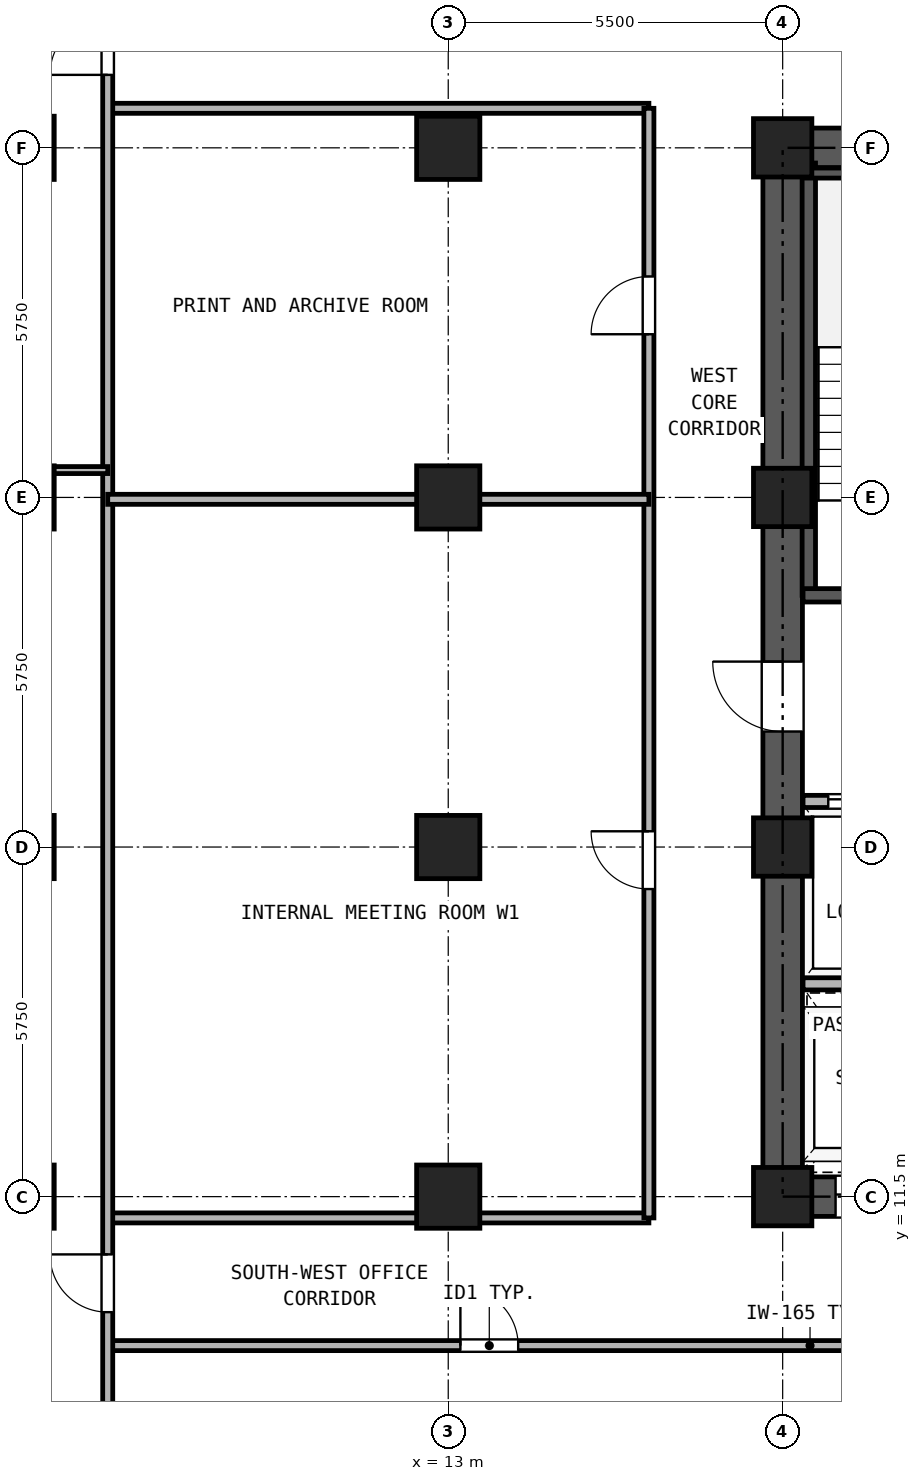
"""IFC4 building model, lengths in metres.
Left out: names, types, materials, properties, quantities, classifications, styles, units other than length and angle.
Written with IfcOpenShell. Run it as: python <this file> out.ifc"""

import sys

from ifc_helpers import new_model, si_unit, direction, frame, frame_2d, origin, origin_2d, place, context, subcontext, project, spatial, rectangle, hollow_rectangle, extrude, source, transform, mapped, element, fill, save


model = new_model("IFC4")
c1 = context("Model", 3, precision=1e-05, world=origin(), true_north=direction((0.0, 1.0)))
c2 = subcontext(c1, "Body", "Model", "MODEL_VIEW")
j1 = project(units=[si_unit("LENGTHUNIT", "METRE"), si_unit("PLANEANGLEUNIT", "RADIAN")], contexts=[c1])
p1 = place(None, origin())
s1 = spatial("IfcSite", under=j1, at=p1, CompositionType="ELEMENT")
p2 = place(p1, origin())
s2 = spatial("IfcBuilding", under=s1, at=p2, CompositionType="ELEMENT")
p3 = place(p2, frame((0.0, 0.0, 36.9)))
s3 = spatial("IfcBuildingStorey", under=s2, at=p3, CompositionType="ELEMENT", Elevation=36.9)
m1 = source(origin(), c2, "Body", "SweptSolid", [
    extrude(hollow_rectangle(XDim=1.04, YDim=1.04, WallThickness=0.065, at=origin_2d()), origin(), (0.0, 0.0, 1.0), 3.32),
])
for number, where, z_axis, x_axis in (
    (1, (6.0, 11.5, 0.0), (0.0, 0.0, 1.0), (1.0, 0.0, 0.0)),
    (2, (6.0, 17.25, 0.0), (0.0, 0.0, 1.0), (1.0, 0.0, 0.0)),
    (3, (6.0, 23.0, 0.0), (0.0, 0.0, 1.0), (1.0, 0.0, 0.0)),
    (4, (6.0, 28.75, 0.0), (0.0, 0.0, 1.0), (1.0, 0.0, 0.0)),
    (5, (13.0, 11.5, 0.0), (0.0, 0.0, 1.0), (1.0, 0.0, 0.0)),
    (6, (13.0, 17.25, 0.0), (0.0, 0.0, 1.0), (1.0, 0.0, 0.0)),
    (7, (13.0, 23.0, 0.0), (0.0, 0.0, 1.0), (1.0, 0.0, 0.0)),
    (8, (13.0, 28.75, 0.0), (0.0, 0.0, 1.0), (1.0, 0.0, 0.0)),
):
    element("IfcColumn", number, at=place(p3, frame(where, z_axis=z_axis, x_axis=x_axis)), inside=s3, PredefinedType="COLUMN", context=c2, shape_type="MappedRepresentation", body=[
        mapped(m1, transform((0.0, 0.0, 0.0), x_axis=(1.0, 0.0, 0.0), y_axis=(0.0, 1.0, 0.0), z_axis=(0.0, 0.0, 1.0), scale=1.0)),
    ])
m2 = source(origin(), c2, "Body", "SweptSolid", [
    extrude(hollow_rectangle(XDim=0.96, YDim=0.96, WallThickness=0.06, at=origin_2d()), origin(), (0.0, 0.0, 1.0), 3.32),
])
for number, where, z_axis, x_axis in (
    (9, (18.5, 11.5, 0.0), (0.0, 0.0, 1.0), (1.0, 0.0, 0.0)),
    (10, (18.5, 17.25, 0.0), (0.0, 0.0, 1.0), (1.0, 0.0, 0.0)),
    (11, (18.5, 23.0, 0.0), (0.0, 0.0, 1.0), (1.0, 0.0, 0.0)),
    (12, (18.5, 28.75, 0.0), (0.0, 0.0, 1.0), (1.0, 0.0, 0.0)),
):
    element("IfcColumn", number, at=place(p3, frame(where, z_axis=z_axis, x_axis=x_axis)), inside=s3, PredefinedType="COLUMN", context=c2, shape_type="MappedRepresentation", body=[
        mapped(m2, transform((0.0, 0.0, 0.0), x_axis=(1.0, 0.0, 0.0), y_axis=(0.0, 1.0, 0.0), z_axis=(0.0, 0.0, 1.0), scale=1.0)),
    ])
p4 = place(p3, frame((18.175, 11.5, 0.0), z_axis=(0.0, 0.0, 1.0), x_axis=(1.0, 0.0, 0.0)))
e13 = element("IfcWall", 13, at=p4, inside=s3, PredefinedType="SHEAR", context=c2, shape_type="SweptSolid", body=[
    extrude(rectangle(XDim=10.65, YDim=0.65, at=frame_2d((5.325, 0.0))), origin(), (0.0, 0.0, 1.0), 3.32),
])
p5 = place(p4, frame((1.195, 0.0, 0.0)))
e14 = element("IfcOpeningElement", 14, at=p5, cuts=e13, PredefinedType="OPENING", context=c2, shape_type="SweptSolid", body=[
    extrude(rectangle(XDim=1.1, YDim=2.25, at=frame_2d((0.55, 1.125))), frame((0.0, 0.335, 0.0), z_axis=(0.0, -1.0, 0.0), x_axis=(1.0, 0.0, 0.0)), (0.0, 0.0, 1.0), 0.67),
])
p6 = place(p4, frame((3.495, 0.0, 0.0)))
e15 = element("IfcOpeningElement", 15, at=p6, cuts=e13, PredefinedType="OPENING", context=c2, shape_type="SweptSolid", body=[
    extrude(rectangle(XDim=1.1, YDim=2.25, at=frame_2d((0.55, 1.125))), frame((0.0, 0.335, 0.0), z_axis=(0.0, -1.0, 0.0), x_axis=(1.0, 0.0, 0.0)), (0.0, 0.0, 1.0), 0.67),
])
p7 = place(p4, frame((5.925, 0.0, 0.0)))
e16 = element("IfcOpeningElement", 16, at=p7, cuts=e13, PredefinedType="OPENING", context=c2, shape_type="SweptSolid", body=[
    extrude(rectangle(XDim=1.1, YDim=2.25, at=frame_2d((0.55, 1.125))), frame((0.0, 0.335, 0.0), z_axis=(0.0, -1.0, 0.0), x_axis=(1.0, 0.0, 0.0)), (0.0, 0.0, 1.0), 0.67),
])
p8 = place(p4, frame((8.325, 0.0, 0.0)))
e17 = element("IfcOpeningElement", 17, at=p8, cuts=e13, PredefinedType="OPENING", context=c2, shape_type="SweptSolid", body=[
    extrude(rectangle(XDim=1.1, YDim=2.25, at=frame_2d((0.55, 1.125))), frame((0.0, 0.335, 0.0), z_axis=(0.0, -1.0, 0.0), x_axis=(1.0, 0.0, 0.0)), (0.0, 0.0, 1.0), 0.67),
])
p9 = place(p3, frame((18.175, 28.75, 0.0), z_axis=(0.0, 0.0, 1.0), x_axis=(1.0, 0.0, 0.0)))
e18 = element("IfcWall", 18, at=p9, inside=s3, PredefinedType="SHEAR", context=c2, shape_type="SweptSolid", body=[
    extrude(rectangle(XDim=10.65, YDim=0.65, at=frame_2d((5.325, 0.0))), origin(), (0.0, 0.0, 1.0), 3.32),
])
p10 = place(p9, frame((4.205, 0.0, 0.0)))
e19 = element("IfcOpeningElement", 19, at=p10, cuts=e18, PredefinedType="OPENING", context=c2, shape_type="SweptSolid", body=[
    extrude(rectangle(XDim=0.9, YDim=2.05, at=frame_2d((0.45, 1.025))), frame((0.0, 0.335, 0.0), z_axis=(0.0, -1.0, 0.0), x_axis=(1.0, 0.0, 0.0)), (0.0, 0.0, 1.0), 0.67),
])
p11 = place(p9, frame((5.745, 0.0, 0.0)))
e20 = element("IfcOpeningElement", 20, at=p11, cuts=e18, PredefinedType="OPENING", context=c2, shape_type="SweptSolid", body=[
    extrude(rectangle(XDim=0.9, YDim=2.05, at=frame_2d((0.45, 1.025))), frame((0.0, 0.335, 0.0), z_axis=(0.0, -1.0, 0.0), x_axis=(1.0, 0.0, 0.0)), (0.0, 0.0, 1.0), 0.67),
])
p12 = place(p3, frame((18.5, 11.825, 0.0), z_axis=(0.0, 0.0, 1.0), x_axis=(0.0, 1.0, 0.0)))
e21 = element("IfcWall", 21, at=p12, inside=s3, PredefinedType="SHEAR", context=c2, shape_type="SweptSolid", body=[
    extrude(rectangle(XDim=16.6, YDim=0.65, at=frame_2d((8.3, 0.0))), origin(), (0.0, 0.0, 1.0), 3.32),
])
p13 = place(p12, frame((7.325, 0.0, 0.0)))
e22 = element("IfcOpeningElement", 22, at=p13, cuts=e21, PredefinedType="OPENING", context=c2, shape_type="SweptSolid", body=[
    extrude(rectangle(XDim=1.15, YDim=2.2, at=frame_2d((0.575, 1.1))), frame((0.0, 0.335, 0.0), z_axis=(0.0, -1.0, 0.0), x_axis=(1.0, 0.0, 0.0)), (0.0, 0.0, 1.0), 0.67),
])
p14 = place(p3, frame((18.93, 21.39, 0.0), z_axis=(0.0, 0.0, 1.0), x_axis=(0.0, 1.0, 0.0)))
e23 = element("IfcWall", 23, at=p14, inside=s3, PredefinedType="SOLIDWALL", context=c2, shape_type="SweptSolid", body=[
    extrude(rectangle(XDim=7.11, YDim=0.22, at=frame_2d((3.555, 0.0))), origin(), (0.0, 0.0, 1.0), 3.32),
])
p15 = place(p3, frame((18.835, 28.335, 0.0), z_axis=(0.0, 0.0, 1.0), x_axis=(1.0, 0.0, 0.0)))
e24 = element("IfcWall", 24, at=p15, inside=s3, PredefinedType="PARTITIONING", context=c2, shape_type="SweptSolid", body=[
    extrude(rectangle(XDim=3.275, YDim=0.165, at=frame_2d((1.638, 0.0))), origin(), (0.0, 0.0, 1.0), 3.32),
])
p16 = place(p3, frame((18.835, 21.39, 0.0), z_axis=(0.0, 0.0, 1.0), x_axis=(1.0, 0.0, 0.0)))
e25 = element("IfcWall", 25, at=p16, inside=s3, PredefinedType="SOLIDWALL", context=c2, shape_type="SweptSolid", body=[
    extrude(rectangle(XDim=6.295, YDim=0.22, at=frame_2d((3.147, 0.0))), origin(), (0.0, 0.0, 1.0), 3.32),
])
p17 = place(p16, frame((1.015, 0.0, 0.0)))
e26 = element("IfcOpeningElement", 26, at=p17, cuts=e25, PredefinedType="OPENING", context=c2, shape_type="SweptSolid", body=[
    extrude(rectangle(XDim=1.15, YDim=2.2, at=frame_2d((0.575, 1.1))), frame((0.0, 0.12, 0.0), z_axis=(0.0, -1.0, 0.0), x_axis=(1.0, 0.0, 0.0)), (0.0, 0.0, 1.0), 0.24),
])
p18 = place(p16, frame((4.745, 0.0, 0.0)))
e27 = element("IfcOpeningElement", 27, at=p18, cuts=e25, PredefinedType="OPENING", context=c2, shape_type="SweptSolid", body=[
    extrude(rectangle(XDim=1.1, YDim=2.25, at=frame_2d((0.55, 1.125))), frame((0.0, 0.12, 0.0), z_axis=(0.0, -1.0, 0.0), x_axis=(1.0, 0.0, 0.0)), (0.0, 0.0, 1.0), 0.24),
])
p19 = place(p3, frame((18.835, 18.0, 0.0), z_axis=(0.0, 0.0, 1.0), x_axis=(1.0, 0.0, 0.0)))
e28 = element("IfcWall", 28, at=p19, inside=s3, PredefinedType="PARTITIONING", context=c2, shape_type="SweptSolid", body=[
    extrude(rectangle(XDim=9.33, YDim=0.2, at=frame_2d((4.665, 0.0))), origin(), (0.0, 0.0, 1.0), 3.32),
])
p20 = place(p19, frame((0.415, 0.0, 0.0)))
e29 = element("IfcOpeningElement", 29, at=p20, cuts=e28, PredefinedType="OPENING", context=c2, shape_type="SweptSolid", body=[
    extrude(rectangle(XDim=1.3, YDim=2.3, at=frame_2d((0.65, 1.15))), frame((0.0, 0.11, 0.0), z_axis=(0.0, -1.0, 0.0), x_axis=(1.0, 0.0, 0.0)), (0.0, 0.0, 1.0), 0.22),
])
p21 = place(p19, frame((2.515, 0.0, 0.0)))
e30 = element("IfcOpeningElement", 30, at=p21, cuts=e28, PredefinedType="OPENING", context=c2, shape_type="SweptSolid", body=[
    extrude(rectangle(XDim=1.3, YDim=2.3, at=frame_2d((0.65, 1.15))), frame((0.0, 0.11, 0.0), z_axis=(0.0, -1.0, 0.0), x_axis=(1.0, 0.0, 0.0)), (0.0, 0.0, 1.0), 0.22),
])
p22 = place(p19, frame((7.015, 0.0, 0.0)))
e31 = element("IfcOpeningElement", 31, at=p22, cuts=e28, PredefinedType="OPENING", context=c2, shape_type="SweptSolid", body=[
    extrude(rectangle(XDim=1.0, YDim=2.15, at=frame_2d((0.5, 1.075))), frame((0.0, 0.11, 0.0), z_axis=(0.0, -1.0, 0.0), x_axis=(1.0, 0.0, 0.0)), (0.0, 0.0, 1.0), 0.22),
])
p23 = place(p3, frame((18.835, 15.0, 0.0), z_axis=(0.0, 0.0, 1.0), x_axis=(1.0, 0.0, 0.0)))
e32 = element("IfcWall", 32, at=p23, inside=s3, PredefinedType="PARTITIONING", context=c2, shape_type="SweptSolid", body=[
    extrude(rectangle(XDim=9.33, YDim=0.2, at=frame_2d((4.665, 0.0))), origin(), (0.0, 0.0, 1.0), 3.32),
])
p24 = place(p3, frame((7.4, 9.05, 0.0), z_axis=(0.0, 0.0, 1.0), x_axis=(1.0, 0.0, 0.0)))
e33 = element("IfcWall", 33, at=p24, inside=s3, PredefinedType="PARTITIONING", context=c2, shape_type="SweptSolid", body=[
    extrude(rectangle(XDim=32.2, YDim=0.165, at=frame_2d((16.1, 0.0))), origin(), (0.0, 0.0, 1.0), 3.32),
])
p25 = place(p24, frame((5.8, 0.0, 0.0)))
e34 = element("IfcOpeningElement", 34, at=p25, cuts=e33, PredefinedType="OPENING", context=c2, shape_type="SweptSolid", body=[
    extrude(rectangle(XDim=0.95, YDim=2.15, at=frame_2d((0.475, 1.075))), frame((0.0, 0.093, 0.0), z_axis=(0.0, -1.0, 0.0), x_axis=(1.0, 0.0, 0.0)), (0.0, 0.0, 1.0), 0.185),
])
p26 = place(p24, frame((16.35, 0.0, 0.0)))
e35 = element("IfcOpeningElement", 35, at=p26, cuts=e33, PredefinedType="OPENING", context=c2, shape_type="SweptSolid", body=[
    extrude(rectangle(XDim=0.95, YDim=2.15, at=frame_2d((0.475, 1.075))), frame((0.0, 0.093, 0.0), z_axis=(0.0, -1.0, 0.0), x_axis=(1.0, 0.0, 0.0)), (0.0, 0.0, 1.0), 0.185),
])
p27 = place(p24, frame((23.6, 0.0, 0.0)))
e36 = element("IfcOpeningElement", 36, at=p27, cuts=e33, PredefinedType="OPENING", context=c2, shape_type="SweptSolid", body=[
    extrude(rectangle(XDim=0.95, YDim=2.15, at=frame_2d((0.475, 1.075))), frame((0.0, 0.093, 0.0), z_axis=(0.0, -1.0, 0.0), x_axis=(1.0, 0.0, 0.0)), (0.0, 0.0, 1.0), 0.185),
])
p28 = place(p24, frame((27.95, 0.0, 0.0)))
e37 = element("IfcOpeningElement", 37, at=p28, cuts=e33, PredefinedType="OPENING", context=c2, shape_type="SweptSolid", body=[
    extrude(rectangle(XDim=0.92, YDim=2.1, at=frame_2d((0.46, 1.05))), frame((0.0, 0.093, 0.0), z_axis=(0.0, -1.0, 0.0), x_axis=(1.0, 0.0, 0.0)), (0.0, 0.0, 1.0), 0.185),
])
p29 = place(p24, frame((30.5, 0.0, 0.0)))
e38 = element("IfcOpeningElement", 38, at=p29, cuts=e33, PredefinedType="OPENING", context=c2, shape_type="SweptSolid", body=[
    extrude(rectangle(XDim=0.92, YDim=2.1, at=frame_2d((0.46, 1.05))), frame((0.0, 0.093, 0.0), z_axis=(0.0, -1.0, 0.0), x_axis=(1.0, 0.0, 0.0)), (0.0, 0.0, 1.0), 0.185),
])
for number, where, z_axis, x_axis in (
    (39, (7.4, 11.15, 0.0), (0.0, 0.0, 1.0), (1.0, 0.0, 0.0)),
    (40, (7.4, 29.4, 0.0), (0.0, 0.0, 1.0), (1.0, 0.0, 0.0)),
):
    element("IfcWall", number, at=place(p3, frame(where, z_axis=z_axis, x_axis=x_axis)), inside=s3, PredefinedType="PARTITIONING", context=c2, shape_type="SweptSolid", body=[
        extrude(rectangle(XDim=8.9, YDim=0.165, at=frame_2d((4.45, 0.0))), origin(), (0.0, 0.0, 1.0), 3.32),
    ])
p30 = place(p3, frame((16.3, 11.15, 0.0), z_axis=(0.0, 0.0, 1.0), x_axis=(0.0, 1.0, 0.0)))
e41 = element("IfcWall", 41, at=p30, inside=s3, PredefinedType="PARTITIONING", context=c2, shape_type="SweptSolid", body=[
    extrude(rectangle(XDim=18.25, YDim=0.165, at=frame_2d((9.125, 0.0))), origin(), (0.0, 0.0, 1.0), 3.32),
])
p31 = place(p30, frame((5.409, 0.0, 0.0)))
e42 = element("IfcOpeningElement", 42, at=p31, cuts=e41, PredefinedType="OPENING", context=c2, shape_type="SweptSolid", body=[
    extrude(rectangle(XDim=0.95, YDim=2.15, at=frame_2d((0.475, 1.075))), frame((0.0, 0.093, 0.0), z_axis=(0.0, -1.0, 0.0), x_axis=(1.0, 0.0, 0.0)), (0.0, 0.0, 1.0), 0.185),
])
p32 = place(p30, frame((14.534, 0.0, 0.0)))
e43 = element("IfcOpeningElement", 43, at=p32, cuts=e41, PredefinedType="OPENING", context=c2, shape_type="SweptSolid", body=[
    extrude(rectangle(XDim=0.95, YDim=2.15, at=frame_2d((0.475, 1.075))), frame((0.0, 0.093, 0.0), z_axis=(0.0, -1.0, 0.0), x_axis=(1.0, 0.0, 0.0)), (0.0, 0.0, 1.0), 0.185),
])
p33 = place(p3, frame((7.4, 0.16, 0.0), z_axis=(0.0, 0.0, 1.0), x_axis=(0.0, 1.0, 0.0)))
e44 = element("IfcWall", 44, at=p33, inside=s3, PredefinedType="PARTITIONING", context=c2, shape_type="SweptSolid", body=[
    extrude(rectangle(XDim=40.18, YDim=0.165, at=frame_2d((20.09, 0.0))), origin(), (0.0, 0.0, 1.0), 3.32),
])
p34 = place(p33, frame((9.44, 0.0, 0.0)))
e45 = element("IfcOpeningElement", 45, at=p34, cuts=e44, PredefinedType="OPENING", context=c2, shape_type="SweptSolid", body=[
    extrude(rectangle(XDim=0.95, YDim=2.15, at=frame_2d((0.475, 1.075))), frame((0.0, 0.093, 0.0), z_axis=(0.0, -1.0, 0.0), x_axis=(1.0, 0.0, 0.0)), (0.0, 0.0, 1.0), 0.185),
])
p35 = place(p33, frame((29.79, 0.0, 0.0)))
e46 = element("IfcOpeningElement", 46, at=p35, cuts=e44, PredefinedType="OPENING", context=c2, shape_type="SweptSolid", body=[
    extrude(rectangle(XDim=0.95, YDim=2.15, at=frame_2d((0.475, 1.075))), frame((0.0, 0.093, 0.0), z_axis=(0.0, -1.0, 0.0), x_axis=(1.0, 0.0, 0.0)), (0.0, 0.0, 1.0), 0.185),
])
p36 = place(p3, frame((0.16, 23.45, 0.0), z_axis=(0.0, 0.0, 1.0), x_axis=(1.0, 0.0, 0.0)))
e47 = element("IfcWall", 47, at=p36, inside=s3, PredefinedType="PARTITIONING", context=c2, shape_type="SweptSolid", body=[
    extrude(rectangle(XDim=7.24, YDim=0.115, at=frame_2d((3.62, 0.0))), origin(), (0.0, 0.0, 1.0), 3.32),
])
p37 = place(p3, frame((7.4, 22.969, 0.0), z_axis=(0.0, 0.0, 1.0), x_axis=(1.0, 0.0, 0.0)))
e48 = element("IfcWall", 48, at=p37, inside=s3, PredefinedType="PARTITIONING", context=c2, shape_type="SweptSolid", body=[
    extrude(rectangle(XDim=8.9, YDim=0.165, at=frame_2d((4.45, 0.0))), origin(), (0.0, 0.0, 1.0), 2.539),
])
p38 = place(p20, origin())
e49 = element("IfcDoor", 49, at=p38, inside=s3, OperationType="DOUBLE_DOOR_SLIDING", PredefinedType="DOOR", context=c2, shape_type="SweptSolid", body=[
    extrude(rectangle(XDim=1.3, YDim=2.3, at=frame_2d((0.65, 1.15))), frame((0.0, 0.025, 0.0), z_axis=(0.0, -1.0, 0.0), x_axis=(1.0, 0.0, 0.0)), (0.0, 0.0, 1.0), 0.05),
])
fill(e29, e49)
p39 = place(p13, frame((1.15, 0.0, 0.0), z_axis=(0.0, 0.0, 1.0), x_axis=(-1.0, 0.0, 0.0)))
e50 = element("IfcDoor", 50, at=p39, inside=s3, OperationType="SINGLE_SWING_RIGHT", PredefinedType="DOOR", context=c2, shape_type="SweptSolid", body=[
    extrude(rectangle(XDim=1.15, YDim=2.2, at=frame_2d((0.575, 1.1))), frame((0.0, 0.025, 0.0), z_axis=(0.0, -1.0, 0.0), x_axis=(1.0, 0.0, 0.0)), (0.0, 0.0, 1.0), 0.05),
])
fill(e22, e50)
p40 = place(p5, frame((1.1, 0.0, 0.0), z_axis=(0.0, 0.0, 1.0), x_axis=(-1.0, 0.0, 0.0)))
e51 = element("IfcDoor", 51, at=p40, inside=s3, OperationType="DOUBLE_DOOR_SLIDING", PredefinedType="DOOR", context=c2, shape_type="SweptSolid", body=[
    extrude(rectangle(XDim=1.1, YDim=2.25, at=frame_2d((0.55, 1.125))), frame((0.0, 0.025, 0.0), z_axis=(0.0, -1.0, 0.0), x_axis=(1.0, 0.0, 0.0)), (0.0, 0.0, 1.0), 0.05),
])
fill(e14, e51)
p41 = place(p25, frame((0.95, 0.0, 0.0), z_axis=(0.0, 0.0, 1.0), x_axis=(-1.0, 0.0, 0.0)))
e52 = element("IfcDoor", 52, at=p41, inside=s3, OperationType="SINGLE_SWING_LEFT", PredefinedType="DOOR", context=c2, shape_type="SweptSolid", body=[
    extrude(rectangle(XDim=0.95, YDim=2.15, at=frame_2d((0.475, 1.075))), frame((0.0, 0.025, 0.0), z_axis=(0.0, -1.0, 0.0), x_axis=(1.0, 0.0, 0.0)), (0.0, 0.0, 1.0), 0.05),
])
fill(e34, e52)
p42 = place(p34, frame((0.95, 0.0, 0.0), z_axis=(0.0, 0.0, 1.0), x_axis=(-1.0, 0.0, 0.0)))
e53 = element("IfcDoor", 53, at=p42, inside=s3, OperationType="SINGLE_SWING_RIGHT", PredefinedType="DOOR", context=c2, shape_type="SweptSolid", body=[
    extrude(rectangle(XDim=0.95, YDim=2.15, at=frame_2d((0.475, 1.075))), frame((0.0, 0.025, 0.0), z_axis=(0.0, -1.0, 0.0), x_axis=(1.0, 0.0, 0.0)), (0.0, 0.0, 1.0), 0.05),
])
fill(e45, e53)
p43 = place(p35, frame((0.95, 0.0, 0.0), z_axis=(0.0, 0.0, 1.0), x_axis=(-1.0, 0.0, 0.0)))
e54 = element("IfcDoor", 54, at=p43, inside=s3, OperationType="SINGLE_SWING_LEFT", PredefinedType="DOOR", context=c2, shape_type="SweptSolid", body=[
    extrude(rectangle(XDim=0.95, YDim=2.15, at=frame_2d((0.475, 1.075))), frame((0.0, 0.025, 0.0), z_axis=(0.0, -1.0, 0.0), x_axis=(1.0, 0.0, 0.0)), (0.0, 0.0, 1.0), 0.05),
])
fill(e46, e54)
p44 = place(p31, frame((0.95, 0.0, 0.0), z_axis=(0.0, 0.0, 1.0), x_axis=(-1.0, 0.0, 0.0)))
e55 = element("IfcDoor", 55, at=p44, inside=s3, OperationType="SINGLE_SWING_RIGHT", PredefinedType="DOOR", context=c2, shape_type="SweptSolid", body=[
    extrude(rectangle(XDim=0.95, YDim=2.15, at=frame_2d((0.475, 1.075))), frame((0.0, 0.025, 0.0), z_axis=(0.0, -1.0, 0.0), x_axis=(1.0, 0.0, 0.0)), (0.0, 0.0, 1.0), 0.05),
])
fill(e42, e55)
p45 = place(p32, frame((0.95, 0.0, 0.0), z_axis=(0.0, 0.0, 1.0), x_axis=(-1.0, 0.0, 0.0)))
e56 = element("IfcDoor", 56, at=p45, inside=s3, OperationType="SINGLE_SWING_LEFT", PredefinedType="DOOR", context=c2, shape_type="SweptSolid", body=[
    extrude(rectangle(XDim=0.95, YDim=2.15, at=frame_2d((0.475, 1.075))), frame((0.0, 0.025, 0.0), z_axis=(0.0, -1.0, 0.0), x_axis=(1.0, 0.0, 0.0)), (0.0, 0.0, 1.0), 0.05),
])
fill(e43, e56)
save(model, sys.argv[1])
